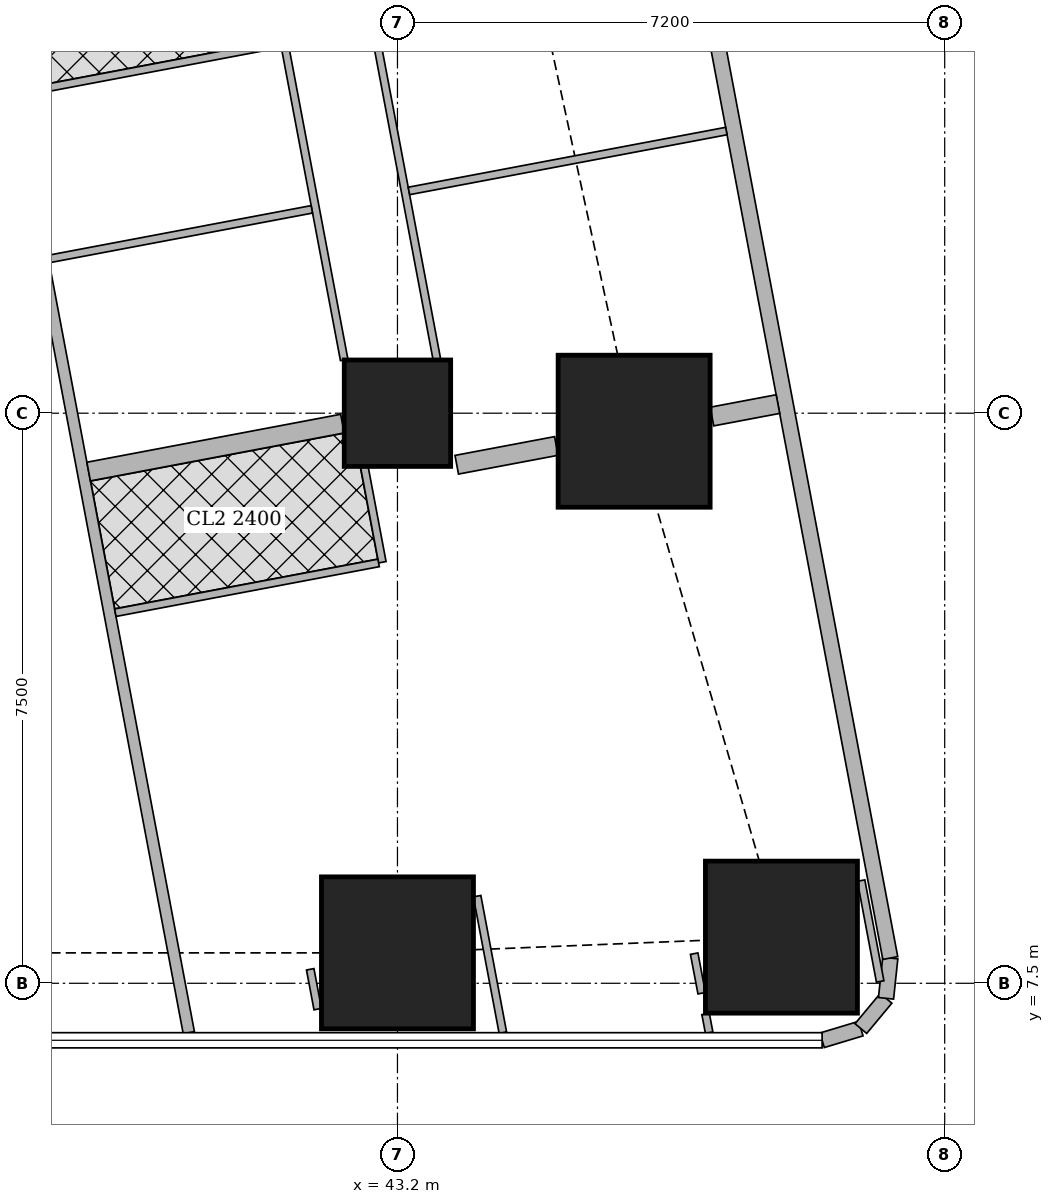
"""IFC4 building model, lengths in metres.
Left out: names, types, materials, properties, quantities, classifications, styles, units other than length and angle.
Written with IfcOpenShell. Run it as: python <this file> out.ifc"""

import sys

from ifc_helpers import new_model, si_unit, direction, frame, frame_2d, origin, origin_2d, place, context, subcontext, project, spatial, rectangle, extrude, element, fill, save


model = new_model("IFC4")
c1 = context("Model", 3, precision=1e-05, world=origin(), true_north=direction((0.0, 1.0)))
c2 = subcontext(c1, "Body", "Model", "MODEL_VIEW")
j1 = project(units=[si_unit("LENGTHUNIT", "METRE"), si_unit("PLANEANGLEUNIT", "RADIAN")], contexts=[c1])
p1 = place(None, origin())
s1 = spatial("IfcSite", under=j1, at=p1, CompositionType="ELEMENT")
p2 = place(p1, origin())
s2 = spatial("IfcBuilding", under=s1, at=p2, CompositionType="ELEMENT")
p3 = place(p2, frame((0.0, 0.0, 274.1)))
s3 = spatial("IfcBuildingStorey", under=s2, at=p3, CompositionType="ELEMENT", Elevation=274.1)
for number, where, z_axis, x_axis in (
    (1, (43.2, 7.9, 0.0), (0.0, 0.0, 1.0), (1.0, 0.0, 0.0)),
    (2, (48.252, 8.107, 0.0), (0.0, 0.0, 1.0), (1.0, 0.0, 0.0)),
):
    element("IfcColumn", number, at=place(p3, frame(where, z_axis=z_axis, x_axis=x_axis)), inside=s3, PredefinedType="COLUMN", context=c2, shape_type="SweptSolid", body=[
        extrude(rectangle(XDim=2.0, YDim=2.0, at=origin_2d()), origin(), (0.0, 0.0, 1.0), 3.75),
    ])
p4 = place(p3, frame((43.2, 15.0, 0.0), z_axis=(0.0, 0.0, 1.0), x_axis=(1.0, 0.0, 0.0)))
e3 = element("IfcColumn", 3, at=p4, inside=s3, PredefinedType="COLUMN", context=c2, shape_type="SweptSolid", body=[
    extrude(rectangle(XDim=1.4, YDim=1.4, at=origin_2d()), origin(), (0.0, 0.0, 1.0), 3.75),
])
p5 = place(p3, frame((46.314, 14.763, 0.0), z_axis=(0.0, 0.0, 1.0), x_axis=(1.0, 0.0, 0.0)))
e4 = element("IfcColumn", 4, at=p5, inside=s3, PredefinedType="COLUMN", context=c2, shape_type="SweptSolid", body=[
    extrude(rectangle(XDim=2.0, YDim=2.0, at=origin_2d()), origin(), (0.0, 0.0, 1.0), 3.75),
])
p6 = place(p3, frame((48.787, 6.75, 0.0), z_axis=(0.0, 0.0, 1.0), x_axis=(0.957282247819, 0.289155145225, 0.0)))
e5 = element("IfcWall", 5, at=p6, inside=s3, PredefinedType="SOLIDWALL", context=c2, shape_type="SweptSolid", body=[
    extrude(rectangle(XDim=0.533, YDim=0.2, at=frame_2d((0.266, 0.0))), origin(), (0.0, 0.0, 1.0), 3.5),
])
p7 = place(p3, frame((49.297, 6.904, 0.0), z_axis=(0.0, 0.0, 1.0), x_axis=(0.639255849474, 0.768994121508, 0.0)))
e6 = element("IfcWall", 6, at=p7, inside=s3, PredefinedType="SOLIDWALL", context=c2, shape_type="SweptSolid", body=[
    extrude(rectangle(XDim=0.518, YDim=0.2, at=frame_2d((0.259, 0.0))), origin(), (0.0, 0.0, 1.0), 3.5),
])
p8 = place(p3, frame((49.628, 7.302, 0.0), z_axis=(0.0, 0.0, 1.0), x_axis=(0.105352390132, 0.994434952068, 0.0)))
e7 = element("IfcWall", 7, at=p8, inside=s3, PredefinedType="SOLIDWALL", context=c2, shape_type="SweptSolid", body=[
    extrude(rectangle(XDim=0.533, YDim=0.2, at=frame_2d((0.267, 0.0))), origin(), (0.0, 0.0, 1.0), 3.5),
])
p9 = place(p3, frame((49.684, 7.832, 0.0), z_axis=(0.0, 0.0, 1.0), x_axis=(-0.185616669694, 0.982622232565, 0.0)))
e8 = element("IfcWall", 8, at=p9, inside=s3, PredefinedType="SOLIDWALL", context=c2, shape_type="SweptSolid", body=[
    extrude(rectangle(XDim=36.0, YDim=0.2, at=frame_2d((18.0, 0.0))), origin(), (0.0, 0.0, 1.0), 3.5),
])
p10 = place(p9, frame((2.518, 0.0, 0.9)))
e9 = element("IfcOpeningElement", 9, at=p10, cuts=e8, PredefinedType="OPENING", context=c2, shape_type="SweptSolid", body=[
    extrude(rectangle(XDim=2.4, YDim=1.5, at=frame_2d((1.2, 0.75))), frame((0.0, 0.11, 0.0), z_axis=(0.0, -1.0, 0.0), x_axis=(1.0, 0.0, 0.0)), (0.0, 0.0, 1.0), 0.22),
])
p11 = place(p9, frame((8.444, 0.0, 0.9)))
e10 = element("IfcOpeningElement", 10, at=p11, cuts=e8, PredefinedType="OPENING", context=c2, shape_type="SweptSolid", body=[
    extrude(rectangle(XDim=1.8, YDim=1.5, at=frame_2d((0.9, 0.75))), frame((0.0, 0.11, 0.0), z_axis=(0.0, -1.0, 0.0), x_axis=(1.0, 0.0, 0.0)), (0.0, 0.0, 1.0), 0.22),
])
p12 = place(p9, frame((12.261, 0.0, 0.9)))
e11 = element("IfcOpeningElement", 11, at=p12, cuts=e8, PredefinedType="OPENING", context=c2, shape_type="SweptSolid", body=[
    extrude(rectangle(XDim=1.8, YDim=1.5, at=frame_2d((0.9, 0.75))), frame((0.0, 0.11, 0.0), z_axis=(0.0, -1.0, 0.0), x_axis=(1.0, 0.0, 0.0)), (0.0, 0.0, 1.0), 0.22),
])
p13 = place(p9, frame((16.078, 0.0, 0.9)))
e12 = element("IfcOpeningElement", 12, at=p13, cuts=e8, PredefinedType="OPENING", context=c2, shape_type="SweptSolid", body=[
    extrude(rectangle(XDim=1.8, YDim=1.5, at=frame_2d((0.9, 0.75))), frame((0.0, 0.11, 0.0), z_axis=(0.0, -1.0, 0.0), x_axis=(1.0, 0.0, 0.0)), (0.0, 0.0, 1.0), 0.22),
])
p14 = place(p9, frame((19.894, 0.0, 0.9)))
e13 = element("IfcOpeningElement", 13, at=p14, cuts=e8, PredefinedType="OPENING", context=c2, shape_type="SweptSolid", body=[
    extrude(rectangle(XDim=1.8, YDim=1.5, at=frame_2d((0.9, 0.75))), frame((0.0, 0.11, 0.0), z_axis=(0.0, -1.0, 0.0), x_axis=(1.0, 0.0, 0.0)), (0.0, 0.0, 1.0), 0.22),
])
p15 = place(p9, frame((23.71, 0.0, 0.9)))
e14 = element("IfcOpeningElement", 14, at=p15, cuts=e8, PredefinedType="OPENING", context=c2, shape_type="SweptSolid", body=[
    extrude(rectangle(XDim=1.8, YDim=1.5, at=frame_2d((0.9, 0.75))), frame((0.0, 0.11, 0.0), z_axis=(0.0, -1.0, 0.0), x_axis=(1.0, 0.0, 0.0)), (0.0, 0.0, 1.0), 0.22),
])
p16 = place(p9, frame((27.526, 0.0, 0.9)))
e15 = element("IfcOpeningElement", 15, at=p16, cuts=e8, PredefinedType="OPENING", context=c2, shape_type="SweptSolid", body=[
    extrude(rectangle(XDim=1.8, YDim=1.5, at=frame_2d((0.9, 0.75))), frame((0.0, 0.11, 0.0), z_axis=(0.0, -1.0, 0.0), x_axis=(1.0, 0.0, 0.0)), (0.0, 0.0, 1.0), 0.22),
])
p17 = place(p9, frame((32.046, 0.0, 0.9)))
e16 = element("IfcOpeningElement", 16, at=p17, cuts=e8, PredefinedType="OPENING", context=c2, shape_type="SweptSolid", body=[
    extrude(rectangle(XDim=1.8, YDim=1.5, at=frame_2d((0.9, 0.75))), frame((0.0, 0.11, 0.0), z_axis=(0.0, -1.0, 0.0), x_axis=(1.0, 0.0, 0.0)), (0.0, 0.0, 1.0), 0.22),
])
p18 = place(p3, frame((33.781, 42.186, 0.0), z_axis=(0.0, 0.0, 1.0), x_axis=(0.185593518645, -0.9826266055, 0.0)))
e17 = element("IfcWall", 17, at=p18, inside=s3, PredefinedType="SOLIDWALL", context=c2, shape_type="SweptSolid", body=[
    extrude(rectangle(XDim=35.961, YDim=0.15, at=frame_2d((17.98, 0.0))), origin(), (0.0, 0.0, 1.0), 2.5),
])
p19 = place(p18, frame((11.76, 0.0, 0.0)))
e18 = element("IfcOpeningElement", 18, at=p19, cuts=e17, PredefinedType="OPENING", context=c2, shape_type="SweptSolid", body=[
    extrude(rectangle(XDim=1.0, YDim=2.1, at=frame_2d((0.5, 1.05))), frame((0.0, 0.085, 0.0), z_axis=(0.0, -1.0, 0.0), x_axis=(1.0, 0.0, 0.0)), (0.0, 0.0, 1.0), 0.17),
])
p20 = place(p18, frame((15.576, 0.0, 0.0)))
e19 = element("IfcOpeningElement", 19, at=p20, cuts=e17, PredefinedType="OPENING", context=c2, shape_type="SweptSolid", body=[
    extrude(rectangle(XDim=1.0, YDim=2.1, at=frame_2d((0.5, 1.05))), frame((0.0, 0.085, 0.0), z_axis=(0.0, -1.0, 0.0), x_axis=(1.0, 0.0, 0.0)), (0.0, 0.0, 1.0), 0.17),
])
p21 = place(p18, frame((30.502, 0.0, 0.0)))
e20 = element("IfcOpeningElement", 20, at=p21, cuts=e17, PredefinedType="OPENING", context=c2, shape_type="SweptSolid", body=[
    extrude(rectangle(XDim=1.0, YDim=2.1, at=frame_2d((0.5, 1.05))), frame((0.0, 0.085, 0.0), z_axis=(0.0, -1.0, 0.0), x_axis=(1.0, 0.0, 0.0)), (0.0, 0.0, 1.0), 0.17),
])
p22 = place(p3, frame((44.248, 8.646, 0.0), z_axis=(0.0, 0.0, 1.0), x_axis=(0.185417594585, -0.982659816833, 0.0)))
e21 = element("IfcWall", 21, at=p22, inside=s3, PredefinedType="PARTITIONING", context=c2, shape_type="SweptSolid", body=[
    extrude(rectangle(XDim=1.828, YDim=0.1, at=frame_2d((0.914, 0.0))), origin(), (0.0, 0.0, 1.0), 2.05),
])
p23 = place(p3, frame((42.151, 7.16, 0.0), z_axis=(0.0, 0.0, 1.0), x_axis=(-0.185366164644, 0.982669519729, 0.0)))
e22 = element("IfcWall", 22, at=p23, inside=s3, PredefinedType="PARTITIONING", context=c2, shape_type="SweptSolid", body=[
    extrude(rectangle(XDim=0.533, YDim=0.1, at=frame_2d((0.267, 0.0))), origin(), (0.0, 0.0, 1.0), 2.5),
])
p24 = place(p3, frame((49.3, 8.851, 0.0), z_axis=(0.0, 0.0, 1.0), x_axis=(0.18581620423, -0.982584519645, 0.0)))
e23 = element("IfcWall", 23, at=p24, inside=s3, PredefinedType="PARTITIONING", context=c2, shape_type="SweptSolid", body=[
    extrude(rectangle(XDim=1.351, YDim=0.1, at=frame_2d((0.675, 0.0))), origin(), (0.0, 0.0, 1.0), 3.5),
])
p25 = place(p3, frame((47.301, 6.85, 0.0), z_axis=(0.0, 0.0, 1.0), x_axis=(-0.187513903188, 0.982261948826, 0.0)))
e24 = element("IfcWall", 24, at=p25, inside=s3, PredefinedType="PARTITIONING", context=c2, shape_type="SweptSolid", body=[
    extrude(rectangle(XDim=0.251, YDim=0.1, at=frame_2d((0.125, 0.0))), origin(), (0.0, 0.0, 1.0), 3.5),
])
p26 = place(p3, frame((47.203, 7.369, 0.0), z_axis=(0.0, 0.0, 1.0), x_axis=(-0.186456243114, 0.982463266185, 0.0)))
e25 = element("IfcWall", 25, at=p26, inside=s3, PredefinedType="PARTITIONING", context=c2, shape_type="SweptSolid", body=[
    extrude(rectangle(XDim=0.53, YDim=0.1, at=frame_2d((0.265, 0.0))), origin(), (0.0, 0.0, 1.0), 2.05),
])
p27 = place(p3, frame((41.894, 25.366, 0.0), z_axis=(0.0, 0.0, 1.0), x_axis=(0.185612905165, -0.982622943675, 0.0)))
e26 = element("IfcWall", 26, at=p27, inside=s3, PredefinedType="PARTITIONING", context=c2, shape_type="SweptSolid", body=[
    extrude(rectangle(XDim=9.827, YDim=0.1, at=frame_2d((4.913, 0.0))), origin(), (0.0, 0.0, 1.0), 2.5),
])
p28 = place(p27, frame((0.151, 0.0, 0.0)))
e27 = element("IfcOpeningElement", 27, at=p28, cuts=e26, PredefinedType="OPENING", context=c2, shape_type="SweptSolid", body=[
    extrude(rectangle(XDim=0.9, YDim=2.1, at=frame_2d((0.45, 1.05))), frame((0.0, 0.06, 0.0), z_axis=(0.0, -1.0, 0.0), x_axis=(1.0, 0.0, 0.0)), (0.0, 0.0, 1.0), 0.12),
])
p29 = place(p27, frame((5.05, 0.0, 0.0)))
e28 = element("IfcOpeningElement", 28, at=p29, cuts=e26, PredefinedType="OPENING", context=c2, shape_type="SweptSolid", body=[
    extrude(rectangle(XDim=0.9, YDim=2.1, at=frame_2d((0.45, 1.05))), frame((0.0, 0.06, 0.0), z_axis=(0.0, -1.0, 0.0), x_axis=(1.0, 0.0, 0.0)), (0.0, 0.0, 1.0), 0.12),
])
p30 = place(p27, frame((7.783, 0.0, 0.0)))
e29 = element("IfcOpeningElement", 29, at=p30, cuts=e26, PredefinedType="OPENING", context=c2, shape_type="SweptSolid", body=[
    extrude(rectangle(XDim=0.9, YDim=2.1, at=frame_2d((0.45, 1.05))), frame((0.0, 0.06, 0.0), z_axis=(0.0, -1.0, 0.0), x_axis=(1.0, 0.0, 0.0)), (0.0, 0.0, 1.0), 0.12),
])
p31 = place(p3, frame((40.706, 25.192, 0.0), z_axis=(0.0, 0.0, 1.0), x_axis=(0.185629824463, -0.982619747547, 0.0)))
e30 = element("IfcWall", 30, at=p31, inside=s3, PredefinedType="PARTITIONING", context=c2, shape_type="SweptSolid", body=[
    extrude(rectangle(XDim=9.659, YDim=0.1, at=frame_2d((4.83, 0.0))), origin(), (0.0, 0.0, 1.0), 2.5),
])
p32 = place(p31, frame((0.575, 0.0, 0.0)))
e31 = element("IfcOpeningElement", 31, at=p32, cuts=e30, PredefinedType="OPENING", context=c2, shape_type="SweptSolid", body=[
    extrude(rectangle(XDim=0.9, YDim=2.1, at=frame_2d((0.45, 1.05))), frame((0.0, 0.06, 0.0), z_axis=(0.0, -1.0, 0.0), x_axis=(1.0, 0.0, 0.0)), (0.0, 0.0, 1.0), 0.12),
])
p33 = place(p31, frame((4.166, 0.0, 0.0)))
e32 = element("IfcOpeningElement", 32, at=p33, cuts=e30, PredefinedType="OPENING", context=c2, shape_type="SweptSolid", body=[
    extrude(rectangle(XDim=0.9, YDim=2.1, at=frame_2d((0.45, 1.05))), frame((0.0, 0.06, 0.0), z_axis=(0.0, -1.0, 0.0), x_axis=(1.0, 0.0, 0.0)), (0.0, 0.0, 1.0), 0.12),
])
p34 = place(p31, frame((2.483, 0.0, 0.0)))
e33 = element("IfcOpeningElement", 33, at=p34, cuts=e30, PredefinedType="OPENING", context=c2, shape_type="SweptSolid", body=[
    extrude(rectangle(XDim=0.9, YDim=2.1, at=frame_2d((0.45, 1.05))), frame((0.0, 0.06, 0.0), z_axis=(0.0, -1.0, 0.0), x_axis=(1.0, 0.0, 0.0)), (0.0, 0.0, 1.0), 0.12),
])
p35 = place(p31, frame((6.074, 0.0, 0.0)))
e34 = element("IfcOpeningElement", 34, at=p35, cuts=e30, PredefinedType="OPENING", context=c2, shape_type="SweptSolid", body=[
    extrude(rectangle(XDim=0.9, YDim=2.1, at=frame_2d((0.45, 1.05))), frame((0.0, 0.06, 0.0), z_axis=(0.0, -1.0, 0.0), x_axis=(1.0, 0.0, 0.0)), (0.0, 0.0, 1.0), 0.12),
])
p36 = place(p3, frame((47.527, 18.712, 0.0), z_axis=(0.0, 0.0, 1.0), x_axis=(-0.982665405803, -0.185387972203, 0.0)))
e35 = element("IfcWall", 35, at=p36, inside=s3, PredefinedType="PARTITIONING", context=c2, shape_type="SweptSolid", body=[
    extrude(rectangle(XDim=4.25, YDim=0.1, at=frame_2d((2.125, 0.0))), origin(), (0.0, 0.0, 1.0), 2.5),
])
p37 = place(p3, frame((42.073, 17.682, 0.0), z_axis=(0.0, 0.0, 1.0), x_axis=(-0.98265117712, -0.185463376723, 0.0)))
e36 = element("IfcWall", 36, at=p37, inside=s3, PredefinedType="PARTITIONING", context=c2, shape_type="SweptSolid", body=[
    extrude(rectangle(XDim=3.525, YDim=0.1, at=frame_2d((1.763, 0.0))), origin(), (0.0, 0.0, 1.0), 3.5),
])
p38 = place(p37, frame((1.325, 0.0, 0.0)))
e37 = element("IfcOpeningElement", 37, at=p38, cuts=e36, PredefinedType="OPENING", context=c2, shape_type="SweptSolid", body=[
    extrude(rectangle(XDim=0.9, YDim=2.1, at=frame_2d((0.45, 1.05))), frame((0.0, 0.06, 0.0), z_axis=(0.0, -1.0, 0.0), x_axis=(1.0, 0.0, 0.0)), (0.0, 0.0, 1.0), 0.12),
])
p39 = place(p3, frame((41.662, 19.861, 0.0), z_axis=(0.0, 0.0, 1.0), x_axis=(-0.982588017646, -0.185797706064, 0.0)))
e38 = element("IfcWall", 38, at=p39, inside=s3, PredefinedType="PARTITIONING", context=c2, shape_type="SweptSolid", body=[
    extrude(rectangle(XDim=3.525, YDim=0.1, at=frame_2d((1.763, 0.0))), origin(), (0.0, 0.0, 1.0), 3.5),
])
p40 = place(p3, frame((42.765, 14.29, 0.0), z_axis=(0.0, 0.0, 1.0), x_axis=(0.185446293138, -0.982654401283, 0.0)))
e39 = element("IfcWall", 39, at=p40, inside=s3, PredefinedType="PARTITIONING", context=c2, shape_type="SweptSolid", body=[
    extrude(rectangle(XDim=1.273, YDim=0.1, at=frame_2d((0.636, 0.0))), origin(), (0.0, 0.0, 1.0), 3.5),
])
p41 = place(p3, frame((42.952, 13.03, 0.0), z_axis=(0.0, 0.0, 1.0), x_axis=(-0.982585626838, -0.185810349366, 0.0)))
e40 = element("IfcWall", 40, at=p41, inside=s3, PredefinedType="PARTITIONING", context=c2, shape_type="SweptSolid", body=[
    extrude(rectangle(XDim=3.525, YDim=0.1, at=frame_2d((1.763, 0.0))), origin(), (0.0, 0.0, 1.0), 3.5),
])
p42 = place(p41, frame((1.299, 0.0, 0.0)))
e41 = element("IfcOpeningElement", 41, at=p42, cuts=e40, PredefinedType="OPENING", context=c2, shape_type="SweptSolid", body=[
    extrude(rectangle(XDim=0.9, YDim=2.1, at=frame_2d((0.45, 1.05))), frame((0.0, 0.06, 0.0), z_axis=(0.0, -1.0, 0.0), x_axis=(1.0, 0.0, 0.0)), (0.0, 0.0, 1.0), 0.12),
])
p43 = place(p3, frame((48.206, 15.12, 0.0), z_axis=(0.0, 0.0, 1.0), x_axis=(-0.982608419258, -0.185689780017, 0.0)))
e42 = element("IfcWall", 42, at=p43, inside=s3, PredefinedType="SOLIDWALL", context=c2, shape_type="SweptSolid", body=[
    extrude(rectangle(XDim=0.884, YDim=0.25, at=frame_2d((0.442, 0.0))), origin(), (0.0, 0.0, 1.0), 3.5),
])
p44 = place(p3, frame((45.29, 14.569, 0.0), z_axis=(0.0, 0.0, 1.0), x_axis=(-0.982676759201, -0.185327782391, 0.0)))
e43 = element("IfcWall", 43, at=p44, inside=s3, PredefinedType="SOLIDWALL", context=c2, shape_type="SweptSolid", body=[
    extrude(rectangle(XDim=1.333, YDim=0.25, at=frame_2d((0.667, 0.0))), origin(), (0.0, 0.0, 1.0), 3.5),
])
p45 = place(p3, frame((42.476, 14.863, 0.0), z_axis=(0.0, 0.0, 1.0), x_axis=(-0.982603567712, -0.185715450942, 0.0)))
e44 = element("IfcWall", 44, at=p45, inside=s3, PredefinedType="SOLIDWALL", context=c2, shape_type="SweptSolid", body=[
    extrude(rectangle(XDim=3.398, YDim=0.25, at=frame_2d((1.699, 0.0))), origin(), (0.0, 0.0, 1.0), 3.5),
])
p46 = place(p10, origin())
e45 = element("IfcWindow", 45, at=p46, inside=s3, PartitioningType="SINGLE_PANEL", PredefinedType="WINDOW", context=c2, shape_type="SweptSolid", body=[
    extrude(rectangle(XDim=2.4, YDim=1.5, at=frame_2d((1.2, 0.75))), frame((0.0, 0.03, 0.0), z_axis=(0.0, -1.0, 0.0), x_axis=(1.0, 0.0, 0.0)), (0.0, 0.0, 1.0), 0.06),
])
fill(e9, e45)
p47 = place(p11, origin())
e46 = element("IfcWindow", 46, at=p47, inside=s3, PartitioningType="SINGLE_PANEL", PredefinedType="WINDOW", context=c2, shape_type="SweptSolid", body=[
    extrude(rectangle(XDim=1.8, YDim=1.5, at=frame_2d((0.9, 0.75))), frame((0.0, 0.03, 0.0), z_axis=(0.0, -1.0, 0.0), x_axis=(1.0, 0.0, 0.0)), (0.0, 0.0, 1.0), 0.06),
])
fill(e10, e46)
p48 = place(p29, origin())
e47 = element("IfcDoor", 47, at=p48, inside=s3, OperationType="SINGLE_SWING_LEFT", PredefinedType="DOOR", context=c2, shape_type="SweptSolid", body=[
    extrude(rectangle(XDim=0.9, YDim=2.1, at=frame_2d((0.45, 1.05))), frame((0.0, 0.025, 0.0), z_axis=(0.0, -1.0, 0.0), x_axis=(1.0, 0.0, 0.0)), (0.0, 0.0, 1.0), 0.05),
])
fill(e28, e47)
p49 = place(p30, origin())
e48 = element("IfcDoor", 48, at=p49, inside=s3, OperationType="SINGLE_SWING_LEFT", PredefinedType="DOOR", context=c2, shape_type="SweptSolid", body=[
    extrude(rectangle(XDim=0.9, YDim=2.1, at=frame_2d((0.45, 1.05))), frame((0.0, 0.025, 0.0), z_axis=(0.0, -1.0, 0.0), x_axis=(1.0, 0.0, 0.0)), (0.0, 0.0, 1.0), 0.05),
])
fill(e29, e48)
p50 = place(p35, origin())
e49 = element("IfcDoor", 49, at=p50, inside=s3, OperationType="SINGLE_SWING_LEFT", PredefinedType="DOOR", context=c2, shape_type="SweptSolid", body=[
    extrude(rectangle(XDim=0.9, YDim=2.1, at=frame_2d((0.45, 1.05))), frame((0.0, 0.025, 0.0), z_axis=(0.0, -1.0, 0.0), x_axis=(1.0, 0.0, 0.0)), (0.0, 0.0, 1.0), 0.05),
])
fill(e34, e49)
p51 = place(p42, origin())
e50 = element("IfcDoor", 50, at=p51, inside=s3, OperationType="SINGLE_SWING_RIGHT", PredefinedType="DOOR", context=c2, shape_type="SweptSolid", body=[
    extrude(rectangle(XDim=0.9, YDim=2.1, at=frame_2d((0.45, 1.05))), frame((0.0, 0.025, 0.0), z_axis=(0.0, -1.0, 0.0), x_axis=(1.0, 0.0, 0.0)), (0.0, 0.0, 1.0), 0.05),
])
fill(e41, e50)
p52 = place(p21, origin())
e51 = element("IfcDoor", 51, at=p52, inside=s3, OperationType="SINGLE_SWING_LEFT", PredefinedType="DOOR", context=c2, shape_type="SweptSolid", body=[
    extrude(rectangle(XDim=1.0, YDim=2.1, at=frame_2d((0.5, 1.05))), frame((0.0, 0.025, 0.0), z_axis=(0.0, -1.0, 0.0), x_axis=(1.0, 0.0, 0.0)), (0.0, 0.0, 1.0), 0.05),
])
fill(e20, e51)
p53 = place(p38, origin())
e52 = element("IfcDoor", 52, at=p53, inside=s3, OperationType="SINGLE_SWING_RIGHT", PredefinedType="DOOR", context=c2, shape_type="SweptSolid", body=[
    extrude(rectangle(XDim=0.9, YDim=2.1, at=frame_2d((0.45, 1.05))), frame((0.0, 0.025, 0.0), z_axis=(0.0, -1.0, 0.0), x_axis=(1.0, 0.0, 0.0)), (0.0, 0.0, 1.0), 0.05),
])
fill(e37, e52)
save(model, sys.argv[1])
